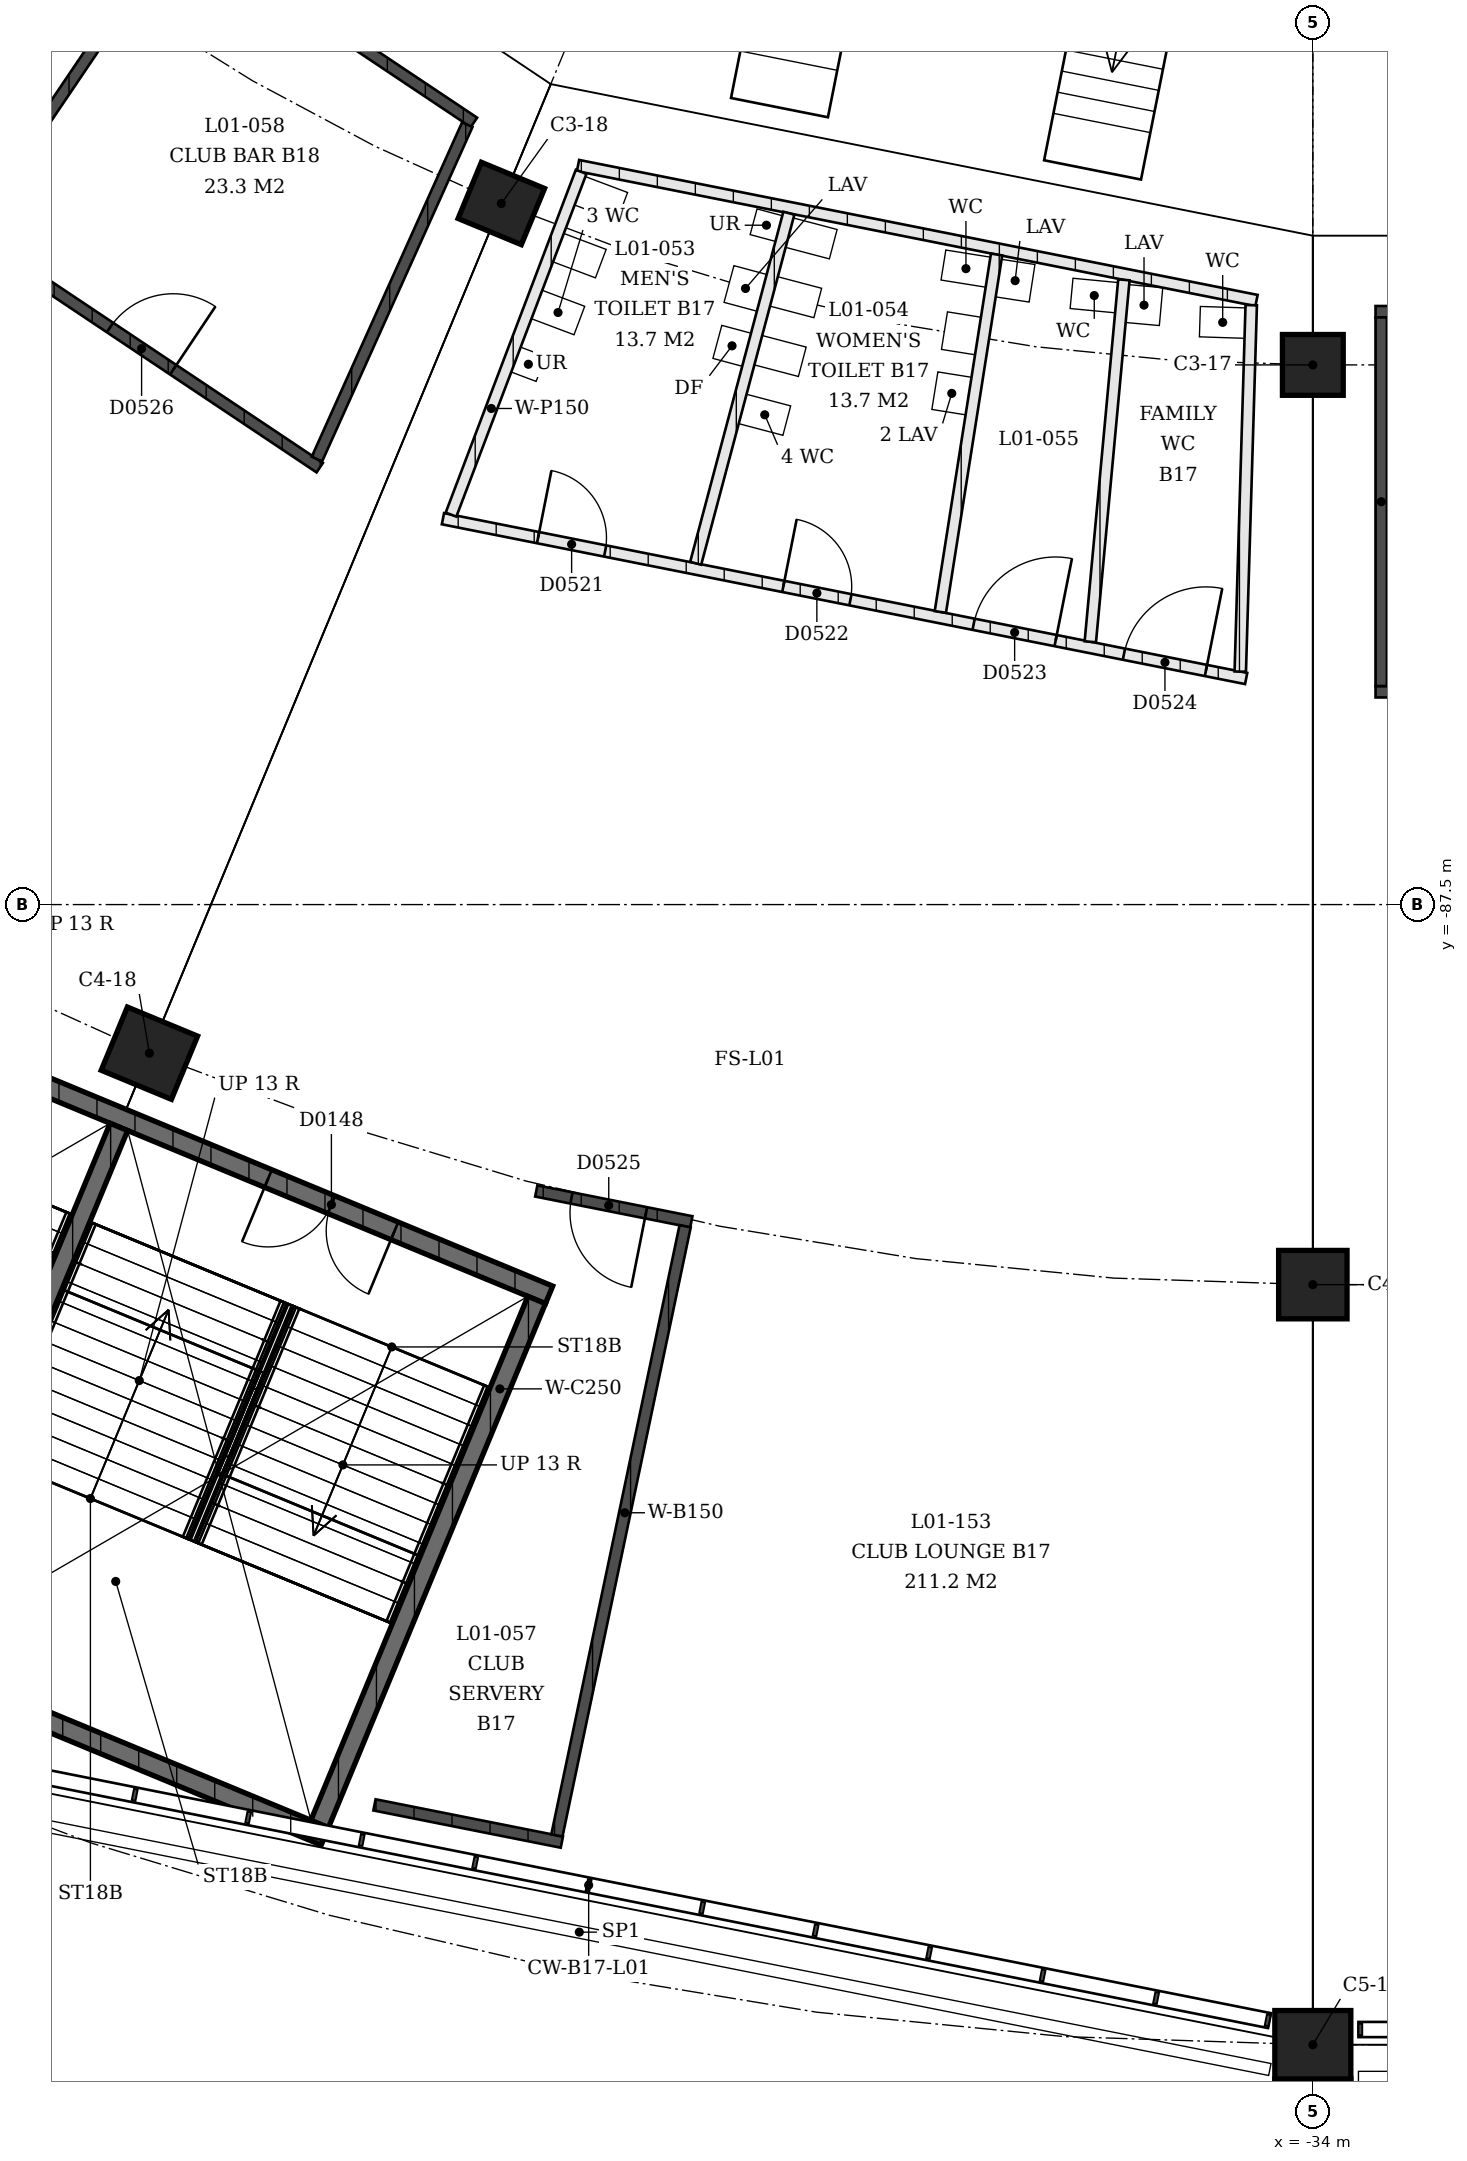
"""IFC4 building model, lengths in metres.
Left out: names, types, materials, properties, quantities, classifications, styles, units other than length and angle.
Written with IfcOpenShell. Run it as: python <this file> out.ifc"""

import sys

from ifc_helpers import new_model, si_unit, direction, frame, frame_2d, origin, origin_2d, place, context, subcontext, project, spatial, rectangle, extrude, element, fill, save


model = new_model("IFC4")
c1 = context("Model", 3, precision=1e-05, world=origin(), true_north=direction((0.0, 1.0)))
c2 = subcontext(c1, "Body", "Model", "MODEL_VIEW")
j1 = project(units=[si_unit("LENGTHUNIT", "METRE"), si_unit("PLANEANGLEUNIT", "RADIAN")], contexts=[c1])
p1 = place(None, origin())
s1 = spatial("IfcSite", under=j1, at=p1, CompositionType="ELEMENT")
p2 = place(p1, origin())
s2 = spatial("IfcBuilding", under=s1, at=p2, CompositionType="ELEMENT")
p3 = place(p2, frame((0.0, 0.0, 4.5)))
s3 = spatial("IfcBuildingStorey", under=s2, at=p3, CompositionType="ELEMENT", Elevation=4.5)
p4 = place(p3, frame((-34.0, -80.4, 0.0), z_axis=(0.0, 0.0, 1.0), x_axis=(1.0, 0.0, 0.0)))
e1 = element("IfcColumn", 1, at=p4, inside=s3, PredefinedType="COLUMN", context=c2, shape_type="SweptSolid", body=[
    extrude(rectangle(XDim=0.8, YDim=0.8, at=origin_2d()), origin(), (0.0, 0.0, 1.0), 4.5),
])
p5 = place(p3, frame((-34.0, -92.5, 0.0), z_axis=(0.0, 0.0, 1.0), x_axis=(1.0, 0.0, 0.0)))
e2 = element("IfcColumn", 2, at=p5, inside=s3, PredefinedType="COLUMN", context=c2, shape_type="SweptSolid", body=[
    extrude(rectangle(XDim=0.9, YDim=0.9, at=origin_2d()), origin(), (0.0, 0.0, 1.0), 4.5),
])
p6 = place(p3, frame((-34.0, -102.5, 0.0), z_axis=(0.0, 0.0, 1.0), x_axis=(1.0, 0.0, 0.0)))
e3 = element("IfcColumn", 3, at=p6, inside=s3, PredefinedType="COLUMN", context=c2, shape_type="SweptSolid", body=[
    extrude(rectangle(XDim=1.0, YDim=0.9, at=origin_2d()), origin(), (0.0, 0.0, 1.0), 4.5),
])
p7 = place(p3, frame((-44.677, -78.276, 0.0), z_axis=(0.0, 0.0, 1.0), x_axis=(0.923879532511, -0.382683432365, 0.0)))
e4 = element("IfcColumn", 4, at=p7, inside=s3, PredefinedType="COLUMN", context=c2, shape_type="SweptSolid", body=[
    extrude(rectangle(XDim=0.9, YDim=0.8, at=origin_2d()), origin(), (0.0, 0.0, 1.0), 4.5),
])
p8 = place(p3, frame((-49.307, -89.455, 0.0), z_axis=(0.0, 0.0, 1.0), x_axis=(0.923879532511, -0.382683432365, 0.0)))
e5 = element("IfcColumn", 5, at=p8, inside=s3, PredefinedType="COLUMN", context=c2, shape_type="SweptSolid", body=[
    extrude(rectangle(XDim=1.0, YDim=0.9, at=origin_2d()), origin(), (0.0, 0.0, 1.0), 4.5),
])
p9 = place(p3, frame((-55.274, -87.985, 0.0), z_axis=(0.0, 0.0, 1.0), x_axis=(0.923877480578, -0.382688386133, 0.0)))
e6 = element("IfcWall", 6, at=p9, inside=s3, PredefinedType="SHEAR", context=c2, shape_type="SweptSolid", body=[
    extrude(rectangle(XDim=12.15, YDim=0.25, at=frame_2d((6.075, 0.0))), origin(), (0.0, 0.0, 1.0), 4.09),
])
p10 = place(p9, frame((2.2, 0.0, 0.0)))
e7 = element("IfcOpeningElement", 7, at=p10, cuts=e6, PredefinedType="OPENING", context=c2, shape_type="SweptSolid", body=[
    extrude(rectangle(XDim=1.8, YDim=2.1, at=frame_2d((0.9, 1.05))), frame((0.0, 0.125, 0.0), z_axis=(0.0, -1.0, 0.0), x_axis=(1.0, 0.0, 0.0)), (0.0, 0.0, 1.0), 0.25),
])
p11 = place(p9, frame((8.15, 0.0, 0.0)))
e8 = element("IfcOpeningElement", 8, at=p11, cuts=e6, PredefinedType="OPENING", context=c2, shape_type="SweptSolid", body=[
    extrude(rectangle(XDim=1.8, YDim=2.1, at=frame_2d((0.9, 1.05))), frame((0.0, 0.125, 0.0), z_axis=(0.0, -1.0, 0.0), x_axis=(1.0, 0.0, 0.0)), (0.0, 0.0, 1.0), 0.25),
])
p12 = place(p3, frame((-58.224, -95.108, 0.0), z_axis=(0.0, 0.0, 1.0), x_axis=(0.923884584817, -0.382671234792, 0.0)))
e9 = element("IfcWall", 9, at=p12, inside=s3, PredefinedType="SHEAR", context=c2, shape_type="SweptSolid", body=[
    extrude(rectangle(XDim=12.15, YDim=0.25, at=frame_2d((6.075, 0.0))), origin(), (0.0, 0.0, 1.0), 4.09),
])
p13 = place(p3, frame((-44.212, -92.702, 0.0), z_axis=(0.0, 0.0, 1.0), x_axis=(-0.382664910245, -0.923887204407, 0.0)))
e10 = element("IfcWall", 10, at=p13, inside=s3, PredefinedType="SHEAR", context=c2, shape_type="SweptSolid", body=[
    extrude(rectangle(XDim=7.46, YDim=0.25, at=frame_2d((3.73, 0.0))), origin(), (0.0, 0.0, 1.0), 4.09),
])
p14 = place(p3, frame((-49.709, -90.425, 0.0), z_axis=(0.0, 0.0, 1.0), x_axis=(-0.382676480483, -0.923882412044, 0.0)))
e11 = element("IfcWall", 11, at=p14, inside=s3, PredefinedType="SHEAR", context=c2, shape_type="SweptSolid", body=[
    extrude(rectangle(XDim=7.46, YDim=0.25, at=frame_2d((3.73, 0.0))), origin(), (0.0, 0.0, 1.0), 4.09),
])
p15 = place(p3, frame((-21.225, -79.7, 0.0), z_axis=(0.0, 0.0, 1.0), x_axis=(-1.0, 0.0, 0.0)))
e12 = element("IfcWall", 12, at=p15, inside=s3, PredefinedType="SOLIDWALL", context=c2, shape_type="SweptSolid", body=[
    extrude(rectangle(XDim=11.95, YDim=0.15, at=frame_2d((5.975, 0.0))), origin(), (0.0, 0.0, 1.0), 3.0),
])
p16 = place(p3, frame((-21.225, -84.7, 0.0), z_axis=(0.0, 0.0, 1.0), x_axis=(-1.0, 0.0, 0.0)))
e13 = element("IfcWall", 13, at=p16, inside=s3, PredefinedType="SOLIDWALL", context=c2, shape_type="SweptSolid", body=[
    extrude(rectangle(XDim=11.95, YDim=0.15, at=frame_2d((5.975, 0.0))), origin(), (0.0, 0.0, 1.0), 3.0),
])
p17 = place(p16, frame((2.525, 0.0, 0.0)))
e14 = element("IfcOpeningElement", 14, at=p17, cuts=e13, PredefinedType="OPENING", context=c2, shape_type="SweptSolid", body=[
    extrude(rectangle(XDim=1.0, YDim=2.1, at=frame_2d((0.5, 1.05))), frame((0.0, 0.075, 0.0), z_axis=(0.0, -1.0, 0.0), x_axis=(1.0, 0.0, 0.0)), (0.0, 0.0, 1.0), 0.15),
])
p18 = place(p16, frame((8.425, 0.0, 0.0)))
e15 = element("IfcOpeningElement", 15, at=p18, cuts=e13, PredefinedType="OPENING", context=c2, shape_type="SweptSolid", body=[
    extrude(rectangle(XDim=1.0, YDim=2.1, at=frame_2d((0.5, 1.05))), frame((0.0, 0.075, 0.0), z_axis=(0.0, -1.0, 0.0), x_axis=(1.0, 0.0, 0.0)), (0.0, 0.0, 1.0), 0.15),
])
p19 = place(p3, frame((-33.1, -79.775, 0.0), z_axis=(0.0, 0.0, 1.0), x_axis=(0.0, -1.0, 0.0)))
e16 = element("IfcWall", 16, at=p19, inside=s3, PredefinedType="SOLIDWALL", context=c2, shape_type="SweptSolid", body=[
    extrude(rectangle(XDim=4.85, YDim=0.15, at=frame_2d((2.425, 0.0))), origin(), (0.0, 0.0, 1.0), 3.0),
])
p20 = place(p3, frame((-43.668, -77.777, 0.0), z_axis=(0.0, 0.0, 1.0), x_axis=(0.980786464492, -0.195084369103, 0.0)))
e17 = element("IfcWall", 17, at=p20, inside=s3, PredefinedType="PARTITIONING", context=c2, shape_type="SweptSolid", body=[
    extrude(rectangle(XDim=9.102, YDim=0.15, at=frame_2d((4.551, 0.0))), origin(), (0.0, 0.0, 1.0), 3.0),
])
p21 = place(p3, frame((-45.445, -82.423, 0.0), z_axis=(0.0, 0.0, 1.0), x_axis=(0.98078580384, -0.195087690502, 0.0)))
e18 = element("IfcWall", 18, at=p21, inside=s3, PredefinedType="PARTITIONING", context=c2, shape_type="SweptSolid", body=[
    extrude(rectangle(XDim=10.775, YDim=0.15, at=frame_2d((5.387, 0.0))), origin(), (0.0, 0.0, 1.0), 3.0),
])
p22 = place(p21, frame((1.276, 0.0, 0.0)))
e19 = element("IfcOpeningElement", 19, at=p22, cuts=e18, PredefinedType="OPENING", context=c2, shape_type="SweptSolid", body=[
    extrude(rectangle(XDim=0.9, YDim=2.1, at=frame_2d((0.45, 1.05))), frame((0.0, 0.075, 0.0), z_axis=(0.0, -1.0, 0.0), x_axis=(1.0, 0.0, 0.0)), (0.0, 0.0, 1.0), 0.15),
])
p23 = place(p21, frame((4.566, 0.0, 0.0)))
e20 = element("IfcOpeningElement", 20, at=p23, cuts=e18, PredefinedType="OPENING", context=c2, shape_type="SweptSolid", body=[
    extrude(rectangle(XDim=0.9, YDim=2.1, at=frame_2d((0.45, 1.05))), frame((0.0, 0.075, 0.0), z_axis=(0.0, -1.0, 0.0), x_axis=(1.0, 0.0, 0.0)), (0.0, 0.0, 1.0), 0.15),
])
p24 = place(p21, frame((7.119, 0.0, 0.0)))
e21 = element("IfcOpeningElement", 21, at=p24, cuts=e18, PredefinedType="OPENING", context=c2, shape_type="SweptSolid", body=[
    extrude(rectangle(XDim=1.1, YDim=2.1, at=frame_2d((0.55, 1.05))), frame((0.0, 0.075, 0.0), z_axis=(0.0, -1.0, 0.0), x_axis=(1.0, 0.0, 0.0)), (0.0, 0.0, 1.0), 0.15),
])
p25 = place(p21, frame((9.135, 0.0, 0.0)))
e22 = element("IfcOpeningElement", 22, at=p25, cuts=e18, PredefinedType="OPENING", context=c2, shape_type="SweptSolid", body=[
    extrude(rectangle(XDim=1.1, YDim=2.1, at=frame_2d((0.55, 1.05))), frame((0.0, 0.075, 0.0), z_axis=(0.0, -1.0, 0.0), x_axis=(1.0, 0.0, 0.0)), (0.0, 0.0, 1.0), 0.15),
])
p26 = place(p3, frame((-43.627, -77.86, 0.0), z_axis=(0.0, 0.0, 1.0), x_axis=(-0.354909029819, -0.934900839957, 0.0)))
e23 = element("IfcWall", 23, at=p26, inside=s3, PredefinedType="PARTITIONING", context=c2, shape_type="SweptSolid", body=[
    extrude(rectangle(XDim=4.823, YDim=0.15, at=frame_2d((2.412, 0.0))), origin(), (0.0, 0.0, 1.0), 3.0),
])
p27 = place(p3, frame((-40.894, -78.404, 0.0), z_axis=(0.0, 0.0, 1.0), x_axis=(-0.257187590259, -0.966361497276, 0.0)))
e24 = element("IfcWall", 24, at=p27, inside=s3, PredefinedType="PARTITIONING", context=c2, shape_type="SweptSolid", body=[
    extrude(rectangle(XDim=4.766, YDim=0.15, at=frame_2d((2.383, 0.0))), origin(), (0.0, 0.0, 1.0), 3.0),
])
p28 = place(p3, frame((-38.161, -78.947, 0.0), z_axis=(0.0, 0.0, 1.0), x_axis=(-0.155385827215, -0.987853857967, 0.0)))
e25 = element("IfcWall", 25, at=p28, inside=s3, PredefinedType="PARTITIONING", context=c2, shape_type="SweptSolid", body=[
    extrude(rectangle(XDim=4.761, YDim=0.15, at=frame_2d((2.38, 0.0))), origin(), (0.0, 0.0, 1.0), 3.0),
])
p29 = place(p3, frame((-36.486, -79.281, 0.0), z_axis=(0.0, 0.0, 1.0), x_axis=(-0.092395037313, -0.995722429736, 0.0)))
e26 = element("IfcWall", 26, at=p29, inside=s3, PredefinedType="PARTITIONING", context=c2, shape_type="SweptSolid", body=[
    extrude(rectangle(XDim=4.783, YDim=0.15, at=frame_2d((2.391, 0.0))), origin(), (0.0, 0.0, 1.0), 3.0),
])
p30 = place(p3, frame((-34.811, -79.614, 0.0), z_axis=(0.0, 0.0, 1.0), x_axis=(-0.02991368842, -0.999552485488, 0.0)))
e27 = element("IfcWall", 27, at=p30, inside=s3, PredefinedType="PARTITIONING", context=c2, shape_type="SweptSolid", body=[
    extrude(rectangle(XDim=4.823, YDim=0.15, at=frame_2d((2.412, 0.0))), origin(), (0.0, 0.0, 1.0), 3.0),
])
p31 = place(p3, frame((-44.217, -91.268, 0.0), z_axis=(0.0, 0.0, 1.0), x_axis=(0.980769797582, -0.195168143279, 0.0)))
e28 = element("IfcWall", 28, at=p31, inside=s3, PredefinedType="SOLIDWALL", context=c2, shape_type="SweptSolid", body=[
    extrude(rectangle(XDim=2.08, YDim=0.15, at=frame_2d((1.04, 0.0))), origin(), (0.0, 0.0, 1.0), 3.0),
])
p32 = place(p31, frame((0.472, 0.0, 0.0)))
e29 = element("IfcOpeningElement", 29, at=p32, cuts=e28, PredefinedType="OPENING", context=c2, shape_type="SweptSolid", body=[
    extrude(rectangle(XDim=1.0, YDim=2.1, at=frame_2d((0.5, 1.05))), frame((0.0, 0.075, 0.0), z_axis=(0.0, -1.0, 0.0), x_axis=(1.0, 0.0, 0.0)), (0.0, 0.0, 1.0), 0.15),
])
p33 = place(p3, frame((-46.346, -99.344, 0.0), z_axis=(0.0, 0.0, 1.0), x_axis=(0.980778163577, -0.195126097309, 0.0)))
e30 = element("IfcWall", 30, at=p33, inside=s3, PredefinedType="SOLIDWALL", context=c2, shape_type="SweptSolid", body=[
    extrude(rectangle(XDim=2.514, YDim=0.15, at=frame_2d((1.257, 0.0))), origin(), (0.0, 0.0, 1.0), 3.0),
])
p34 = place(p3, frame((-42.259, -91.732, 0.0), z_axis=(0.0, 0.0, 1.0), x_axis=(-0.206011983374, -0.978549468707, 0.0)))
e31 = element("IfcWall", 31, at=p34, inside=s3, PredefinedType="SOLIDWALL", context=c2, shape_type="SweptSolid", body=[
    extrude(rectangle(XDim=8.19, YDim=0.15, at=frame_2d((4.095, 0.0))), origin(), (0.0, 0.0, 1.0), 3.0),
])
p35 = place(p3, frame((-45.037, -77.21, 0.0), z_axis=(0.0, 0.0, 1.0), x_axis=(-0.83146970134, 0.555570099766, 0.0)))
e32 = element("IfcWall", 32, at=p35, inside=s3, PredefinedType="SOLIDWALL", context=c2, shape_type="SweptSolid", body=[
    extrude(rectangle(XDim=9.388, YDim=0.15, at=frame_2d((4.694, 0.0))), origin(), (0.0, 0.0, 1.0), 3.0),
])
p36 = place(p3, frame((-47.066, -81.752, 0.0), z_axis=(0.0, 0.0, 1.0), x_axis=(-0.83146852918, 0.555571854024, 0.0)))
e33 = element("IfcWall", 33, at=p36, inside=s3, PredefinedType="SOLIDWALL", context=c2, shape_type="SweptSolid", body=[
    extrude(rectangle(XDim=11.114, YDim=0.15, at=frame_2d((5.557, 0.0))), origin(), (0.0, 0.0, 1.0), 3.0),
])
p37 = place(p36, frame((2.319, 0.0, 0.0)))
e34 = element("IfcOpeningElement", 34, at=p37, cuts=e33, PredefinedType="OPENING", context=c2, shape_type="SweptSolid", body=[
    extrude(rectangle(XDim=1.0, YDim=2.1, at=frame_2d((0.5, 1.05))), frame((0.0, 0.075, 0.0), z_axis=(0.0, -1.0, 0.0), x_axis=(1.0, 0.0, 0.0)), (0.0, 0.0, 1.0), 0.15),
])
p38 = place(p36, frame((7.794, 0.0, 0.0)))
e35 = element("IfcOpeningElement", 35, at=p38, cuts=e33, PredefinedType="OPENING", context=c2, shape_type="SweptSolid", body=[
    extrude(rectangle(XDim=1.0, YDim=2.1, at=frame_2d((0.5, 1.05))), frame((0.0, 0.075, 0.0), z_axis=(0.0, -1.0, 0.0), x_axis=(1.0, 0.0, 0.0)), (0.0, 0.0, 1.0), 0.15),
])
p39 = place(p3, frame((-45.125, -77.24, 0.0), z_axis=(0.0, 0.0, 1.0), x_axis=(-0.410107887306, -0.912037017215, 0.0)))
e36 = element("IfcWall", 36, at=p39, inside=s3, PredefinedType="SOLIDWALL", context=c2, shape_type="SweptSolid", body=[
    extrude(rectangle(XDim=4.823, YDim=0.15, at=frame_2d((2.412, 0.0))), origin(), (0.0, 0.0, 1.0), 3.0),
])
p40 = place(p3, frame((-48.981, -74.663, 0.0), z_axis=(0.0, 0.0, 1.0), x_axis=(-0.559983112244, -0.828504021717, 0.0)))
e37 = element("IfcWall", 37, at=p40, inside=s3, PredefinedType="SOLIDWALL", context=c2, shape_type="SweptSolid", body=[
    extrude(rectangle(XDim=4.757, YDim=0.15, at=frame_2d((2.378, 0.0))), origin(), (0.0, 0.0, 1.0), 3.0),
])
p41 = place(p11, origin())
e38 = element("IfcDoor", 38, at=p41, inside=s3, OperationType="DOUBLE_DOOR_SINGLE_SWING", PredefinedType="DOOR", context=c2, shape_type="SweptSolid", body=[
    extrude(rectangle(XDim=1.8, YDim=2.1, at=frame_2d((0.9, 1.05))), frame((0.0, 0.025, 0.0), z_axis=(0.0, -1.0, 0.0), x_axis=(1.0, 0.0, 0.0)), (0.0, 0.0, 1.0), 0.05),
])
fill(e8, e38)
p42 = place(p22, origin())
e39 = element("IfcDoor", 39, at=p42, inside=s3, OperationType="SINGLE_SWING_RIGHT", PredefinedType="DOOR", context=c2, shape_type="SweptSolid", body=[
    extrude(rectangle(XDim=0.9, YDim=2.1, at=frame_2d((0.45, 1.05))), frame((0.0, 0.025, 0.0), z_axis=(0.0, -1.0, 0.0), x_axis=(1.0, 0.0, 0.0)), (0.0, 0.0, 1.0), 0.05),
])
fill(e19, e39)
p43 = place(p23, origin())
e40 = element("IfcDoor", 40, at=p43, inside=s3, OperationType="SINGLE_SWING_RIGHT", PredefinedType="DOOR", context=c2, shape_type="SweptSolid", body=[
    extrude(rectangle(XDim=0.9, YDim=2.1, at=frame_2d((0.45, 1.05))), frame((0.0, 0.025, 0.0), z_axis=(0.0, -1.0, 0.0), x_axis=(1.0, 0.0, 0.0)), (0.0, 0.0, 1.0), 0.05),
])
fill(e20, e40)
p44 = place(p24, origin())
e41 = element("IfcDoor", 41, at=p44, inside=s3, OperationType="SINGLE_SWING_LEFT", PredefinedType="DOOR", context=c2, shape_type="SweptSolid", body=[
    extrude(rectangle(XDim=1.1, YDim=2.1, at=frame_2d((0.55, 1.05))), frame((0.0, 0.025, 0.0), z_axis=(0.0, -1.0, 0.0), x_axis=(1.0, 0.0, 0.0)), (0.0, 0.0, 1.0), 0.05),
])
fill(e21, e41)
p45 = place(p25, origin())
e42 = element("IfcDoor", 42, at=p45, inside=s3, OperationType="SINGLE_SWING_LEFT", PredefinedType="DOOR", context=c2, shape_type="SweptSolid", body=[
    extrude(rectangle(XDim=1.1, YDim=2.1, at=frame_2d((0.55, 1.05))), frame((0.0, 0.025, 0.0), z_axis=(0.0, -1.0, 0.0), x_axis=(1.0, 0.0, 0.0)), (0.0, 0.0, 1.0), 0.05),
])
fill(e22, e42)
p46 = place(p32, origin())
e43 = element("IfcDoor", 43, at=p46, inside=s3, OperationType="SINGLE_SWING_RIGHT", PredefinedType="DOOR", context=c2, shape_type="SweptSolid", body=[
    extrude(rectangle(XDim=1.0, YDim=2.1, at=frame_2d((0.5, 1.05))), frame((0.0, 0.025, 0.0), z_axis=(0.0, -1.0, 0.0), x_axis=(1.0, 0.0, 0.0)), (0.0, 0.0, 1.0), 0.05),
])
fill(e29, e43)
p47 = place(p37, origin())
e44 = element("IfcDoor", 44, at=p47, inside=s3, OperationType="SINGLE_SWING_LEFT", PredefinedType="DOOR", context=c2, shape_type="SweptSolid", body=[
    extrude(rectangle(XDim=1.0, YDim=2.1, at=frame_2d((0.5, 1.05))), frame((0.0, 0.025, 0.0), z_axis=(0.0, -1.0, 0.0), x_axis=(1.0, 0.0, 0.0)), (0.0, 0.0, 1.0), 0.05),
])
fill(e34, e44)
save(model, sys.argv[1])
